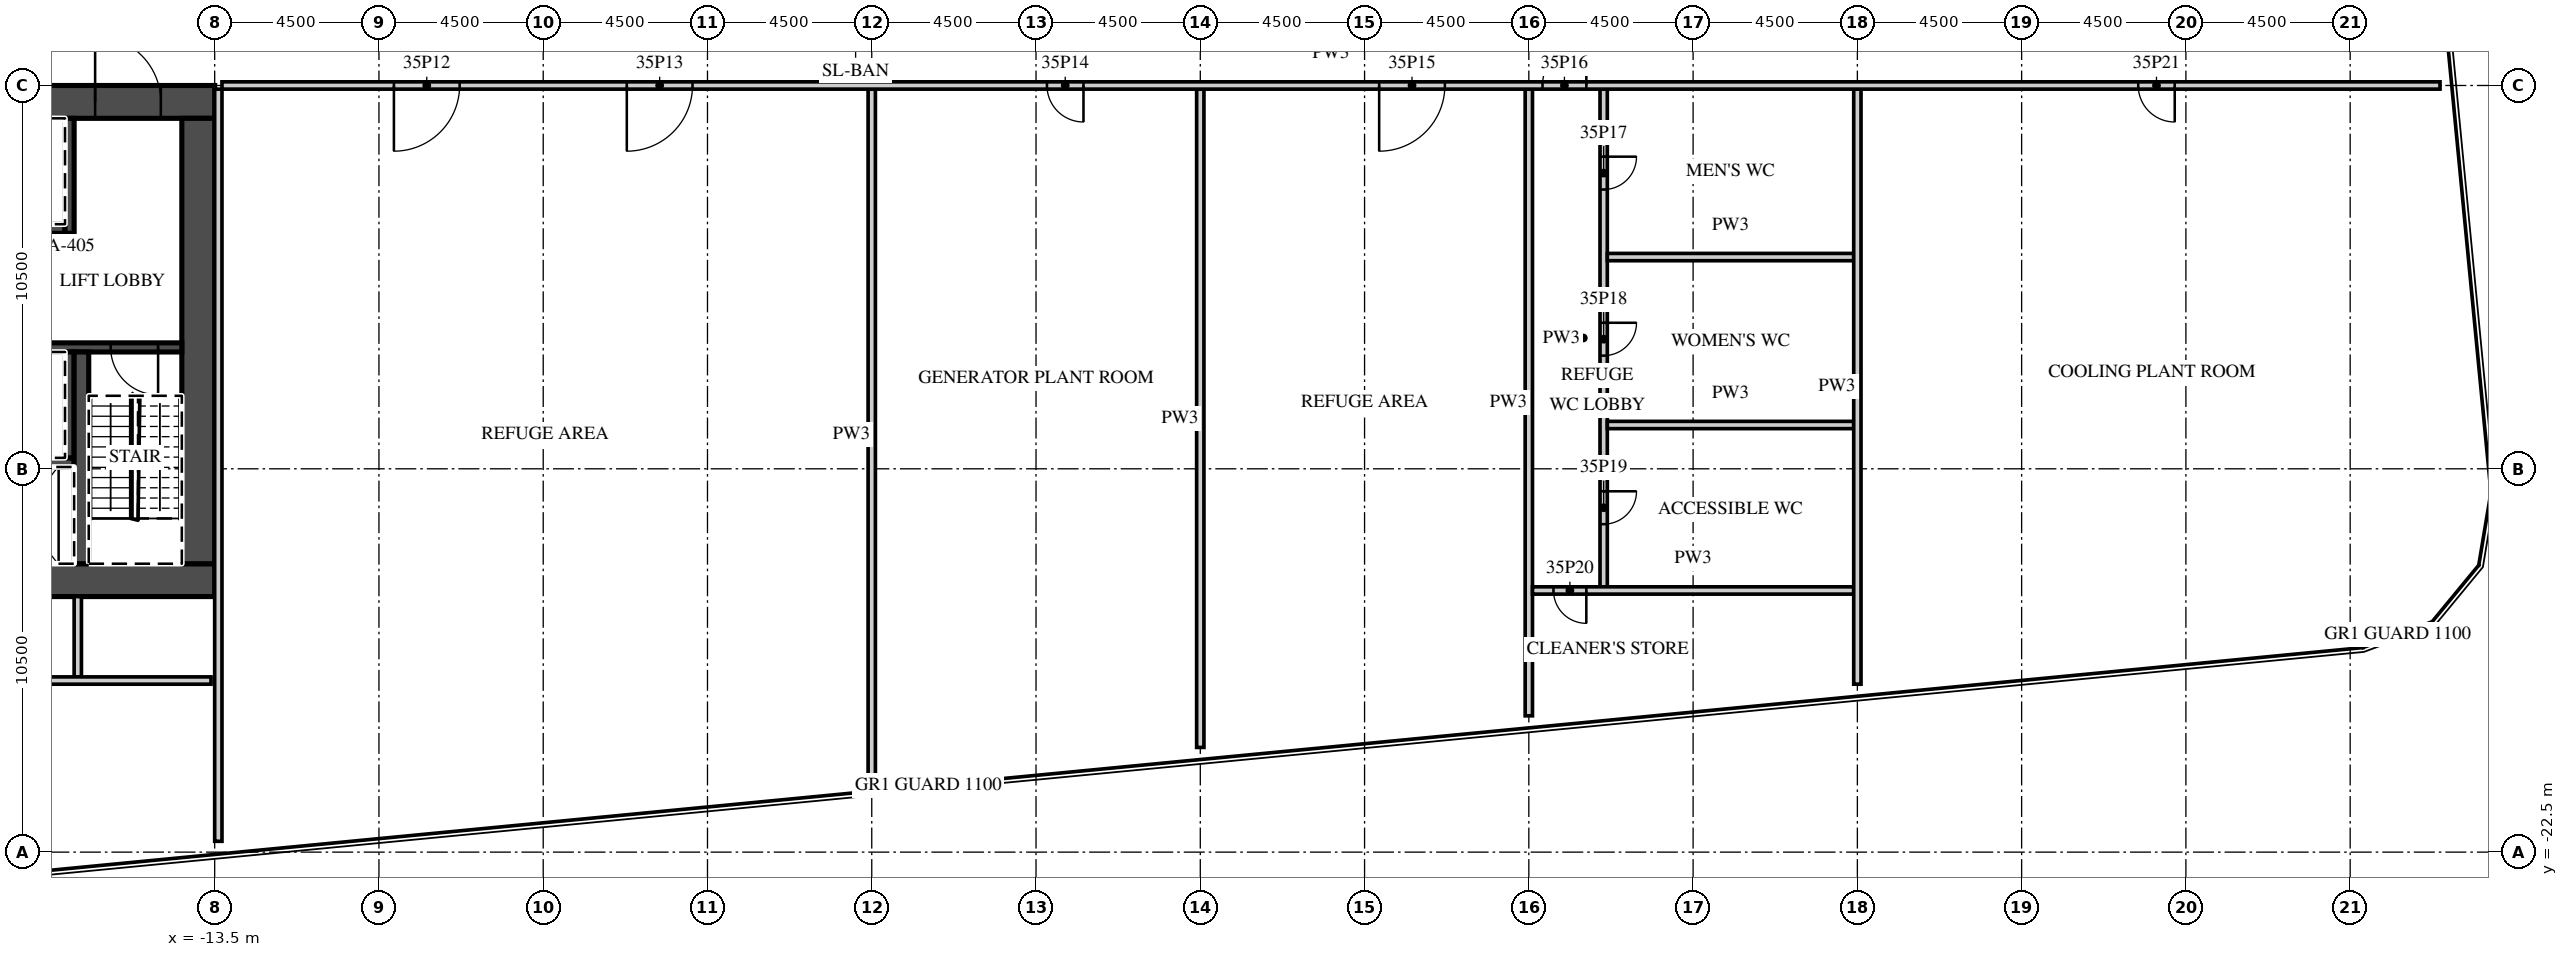
"""IFC4 building model, lengths in metres.
Left out: names, types, materials, properties, quantities, classifications, styles, units other than length and angle.
Written with IfcOpenShell. Run it as: python <this file> out.ifc"""

import sys

from ifc_helpers import new_model, si_unit, direction, frame, frame_2d, origin, place, context, subcontext, project, spatial, rectangle, extrude, element, fill, save


model = new_model("IFC4")
c1 = context("Model", 3, precision=1e-05, world=origin(), true_north=direction((0.0, 1.0)))
c2 = subcontext(c1, "Body", "Model", "MODEL_VIEW")
j1 = project(units=[si_unit("LENGTHUNIT", "METRE"), si_unit("PLANEANGLEUNIT", "RADIAN")], contexts=[c1])
p1 = place(None, origin())
s1 = spatial("IfcSite", under=j1, at=p1, CompositionType="ELEMENT")
p2 = place(p1, origin())
s2 = spatial("IfcBuilding", under=s1, at=p2, CompositionType="ELEMENT")
p3 = place(p2, frame((0.0, 0.0, 150.4)))
s3 = spatial("IfcBuildingStorey", under=s2, at=p3, CompositionType="ELEMENT", Elevation=150.4)
p4 = place(p3, frame((-31.5, -1.95, 0.0), z_axis=(0.0, 0.0, 1.0), x_axis=(1.0, 0.0, 0.0)))
e1 = element("IfcWall", 1, at=p4, inside=s3, PredefinedType="SHEAR", context=c2, shape_type="SweptSolid", body=[
    extrude(rectangle(XDim=18.0, YDim=0.9, at=frame_2d((9.0, 0.0))), origin(), (0.0, 0.0, 1.0), 4.2),
])
p5 = place(p4, frame((14.725, 0.0, 0.0)))
e2 = element("IfcOpeningElement", 2, at=p5, cuts=e1, PredefinedType="OPENING", context=c2, shape_type="SweptSolid", body=[
    extrude(rectangle(XDim=1.8, YDim=2.1, at=frame_2d((0.9, 1.05))), frame((0.0, 0.46, 0.0), z_axis=(0.0, -1.0, 0.0), x_axis=(1.0, 0.0, 0.0)), (0.0, 0.0, 1.0), 0.92),
])
p6 = place(p3, frame((-20.3, -15.05, 0.0), z_axis=(0.0, 0.0, 1.0), x_axis=(1.0, 0.0, 0.0)))
e3 = element("IfcWall", 3, at=p6, inside=s3, PredefinedType="SHEAR", context=c2, shape_type="SweptSolid", body=[
    extrude(rectangle(XDim=6.8, YDim=0.9, at=frame_2d((3.4, 0.0))), origin(), (0.0, 0.0, 1.0), 4.2),
])
p7 = place(p6, frame((0.875, 0.0, 0.0)))
e4 = element("IfcOpeningElement", 4, at=p7, cuts=e3, PredefinedType="OPENING", context=c2, shape_type="SweptSolid", body=[
    extrude(rectangle(XDim=1.2, YDim=2.1, at=frame_2d((0.6, 1.05))), frame((0.0, 0.46, 0.0), z_axis=(0.0, -1.0, 0.0), x_axis=(1.0, 0.0, 0.0)), (0.0, 0.0, 1.0), 0.92),
])
p8 = place(p3, frame((-13.95, -14.6, 0.0), z_axis=(0.0, 0.0, 1.0), x_axis=(0.0, 1.0, 0.0)))
e5 = element("IfcWall", 5, at=p8, inside=s3, PredefinedType="SHEAR", context=c2, shape_type="SweptSolid", body=[
    extrude(rectangle(XDim=12.2, YDim=0.9, at=frame_2d((6.1, 0.0))), origin(), (0.0, 0.0, 1.0), 4.2),
])
p9 = place(p3, frame((-30.6, -5.425, 0.0), z_axis=(0.0, 0.0, 1.0), x_axis=(1.0, 0.0, 0.0)))
e6 = element("IfcWall", 6, at=p9, inside=s3, PredefinedType="SHEAR", context=c2, shape_type="SweptSolid", body=[
    extrude(rectangle(XDim=13.0, YDim=0.25, at=frame_2d((6.5, 0.0))), origin(), (0.0, 0.0, 1.0), 4.2),
])
p10 = place(p3, frame((-17.475, -5.55, 0.0), z_axis=(0.0, 0.0, 1.0), x_axis=(0.0, 1.0, 0.0)))
e7 = element("IfcWall", 7, at=p10, inside=s3, PredefinedType="SHEAR", context=c2, shape_type="SweptSolid", body=[
    extrude(rectangle(XDim=3.15, YDim=0.25, at=frame_2d((1.575, 0.0))), origin(), (0.0, 0.0, 1.0), 4.2),
])
p11 = place(p3, frame((-30.6, -8.675, 0.0), z_axis=(0.0, 0.0, 1.0), x_axis=(1.0, 0.0, 0.0)))
e8 = element("IfcWall", 8, at=p11, inside=s3, PredefinedType="SHEAR", context=c2, shape_type="SweptSolid", body=[
    extrude(rectangle(XDim=16.2, YDim=0.25, at=frame_2d((8.1, 0.0))), origin(), (0.0, 0.0, 1.0), 4.2),
])
p12 = place(p11, frame((0.6, 0.0, 0.0)))
e9 = element("IfcOpeningElement", 9, at=p12, cuts=e8, PredefinedType="OPENING", context=c2, shape_type="SweptSolid", body=[
    extrude(rectangle(XDim=1.2, YDim=2.1, at=frame_2d((0.6, 1.05))), frame((0.0, 0.135, 0.0), z_axis=(0.0, -1.0, 0.0), x_axis=(1.0, 0.0, 0.0)), (0.0, 0.0, 1.0), 0.27),
])
p13 = place(p11, frame((3.25, 0.0, 0.0)))
e10 = element("IfcOpeningElement", 10, at=p13, cuts=e8, PredefinedType="OPENING", context=c2, shape_type="SweptSolid", body=[
    extrude(rectangle(XDim=1.2, YDim=2.1, at=frame_2d((0.6, 1.05))), frame((0.0, 0.135, 0.0), z_axis=(0.0, -1.0, 0.0), x_axis=(1.0, 0.0, 0.0)), (0.0, 0.0, 1.0), 0.27),
])
p14 = place(p11, frame((5.9, 0.0, 0.0)))
e11 = element("IfcOpeningElement", 11, at=p14, cuts=e8, PredefinedType="OPENING", context=c2, shape_type="SweptSolid", body=[
    extrude(rectangle(XDim=1.2, YDim=2.1, at=frame_2d((0.6, 1.05))), frame((0.0, 0.135, 0.0), z_axis=(0.0, -1.0, 0.0), x_axis=(1.0, 0.0, 0.0)), (0.0, 0.0, 1.0), 0.27),
])
p15 = place(p11, frame((14.25, 0.0, 0.0)))
e12 = element("IfcOpeningElement", 12, at=p15, cuts=e8, PredefinedType="OPENING", context=c2, shape_type="SweptSolid", body=[
    extrude(rectangle(XDim=1.3, YDim=2.1, at=frame_2d((0.65, 1.05))), frame((0.0, 0.135, 0.0), z_axis=(0.0, -1.0, 0.0), x_axis=(1.0, 0.0, 0.0)), (0.0, 0.0, 1.0), 0.27),
])
p16 = place(p3, frame((-30.6, -11.825, 0.0), z_axis=(0.0, 0.0, 1.0), x_axis=(1.0, 0.0, 0.0)))
e13 = element("IfcWall", 13, at=p16, inside=s3, PredefinedType="SHEAR", context=c2, shape_type="SweptSolid", body=[
    extrude(rectangle(XDim=13.25, YDim=0.25, at=frame_2d((6.625, 0.0))), origin(), (0.0, 0.0, 1.0), 4.2),
])
p17 = place(p3, frame((-17.475, -11.7, 0.0), z_axis=(0.0, 0.0, 1.0), x_axis=(0.0, 1.0, 0.0)))
e14 = element("IfcWall", 14, at=p17, inside=s3, PredefinedType="SHEAR", context=c2, shape_type="SweptSolid", body=[
    extrude(rectangle(XDim=2.9, YDim=0.25, at=frame_2d((1.45, 0.0))), origin(), (0.0, 0.0, 1.0), 4.2),
])
p18 = place(p3, frame((-17.15, -14.6, 0.0), z_axis=(0.0, 0.0, 1.0), x_axis=(0.0, 1.0, 0.0)))
e15 = element("IfcWall", 15, at=p18, inside=s3, PredefinedType="SHEAR", context=c2, shape_type="SweptSolid", body=[
    extrude(rectangle(XDim=5.8, YDim=0.4, at=frame_2d((2.9, 0.0))), origin(), (0.0, 0.0, 1.0), 4.2),
])
p19 = place(p3, frame((-17.25, -17.7, 0.0), z_axis=(0.0, 0.0, 1.0), x_axis=(0.0, 1.0, 0.0)))
e16 = element("IfcWall", 16, at=p19, inside=s3, PredefinedType="PARTITIONING", context=c2, shape_type="SweptSolid", body=[
    extrude(rectangle(XDim=2.2, YDim=0.2, at=frame_2d((1.1, 0.0))), origin(), (0.0, 0.0, 1.0), 4.2),
])
p20 = place(p3, frame((-37.477, -17.8, 0.0), z_axis=(0.0, 0.0, 1.0), x_axis=(1.0, 0.0, 0.0)))
e17 = element("IfcWall", 17, at=p20, inside=s3, PredefinedType="PARTITIONING", context=c2, shape_type="SweptSolid", body=[
    extrude(rectangle(XDim=23.877, YDim=0.2, at=frame_2d((11.938, 0.0))), origin(), (0.0, 0.0, 1.0), 4.2),
])
p21 = place(p20, frame((6.365, 0.0, 0.0)))
e18 = element("IfcOpeningElement", 18, at=p21, cuts=e17, PredefinedType="OPENING", context=c2, shape_type="SweptSolid", body=[
    extrude(rectangle(XDim=0.9, YDim=2.1, at=frame_2d((0.45, 1.05))), frame((0.0, 0.11, 0.0), z_axis=(0.0, -1.0, 0.0), x_axis=(1.0, 0.0, 0.0)), (0.0, 0.0, 1.0), 0.22),
])
p22 = place(p20, frame((14.665, 0.0, 0.0)))
e19 = element("IfcOpeningElement", 19, at=p22, cuts=e17, PredefinedType="OPENING", context=c2, shape_type="SweptSolid", body=[
    extrude(rectangle(XDim=0.9, YDim=2.1, at=frame_2d((0.45, 1.05))), frame((0.0, 0.11, 0.0), z_axis=(0.0, -1.0, 0.0), x_axis=(1.0, 0.0, 0.0)), (0.0, 0.0, 1.0), 0.22),
])
p23 = place(p3, frame((4.5, -20.499, 0.0), z_axis=(0.0, 0.0, 1.0), x_axis=(0.0, 1.0, 0.0)))
e20 = element("IfcWall", 20, at=p23, inside=s3, PredefinedType="PARTITIONING", context=c2, shape_type="SweptSolid", body=[
    extrude(rectangle(XDim=18.899, YDim=0.2, at=frame_2d((9.45, 0.0))), origin(), (0.0, 0.0, 1.0), 4.2),
])
p24 = place(p3, frame((13.5, -19.633, 0.0), z_axis=(0.0, 0.0, 1.0), x_axis=(0.0, 1.0, 0.0)))
e21 = element("IfcWall", 21, at=p24, inside=s3, PredefinedType="PARTITIONING", context=c2, shape_type="SweptSolid", body=[
    extrude(rectangle(XDim=18.032, YDim=0.2, at=frame_2d((9.016, 0.0))), origin(), (0.0, 0.0, 1.0), 4.2),
])
p25 = place(p3, frame((22.5, -18.766, 0.0), z_axis=(0.0, 0.0, 1.0), x_axis=(0.0, 1.0, 0.0)))
e22 = element("IfcWall", 22, at=p25, inside=s3, PredefinedType="PARTITIONING", context=c2, shape_type="SweptSolid", body=[
    extrude(rectangle(XDim=17.166, YDim=0.2, at=frame_2d((8.583, 0.0))), origin(), (0.0, 0.0, 1.0), 4.2),
])
p26 = place(p3, frame((24.55, -15.233, 0.0), z_axis=(0.0, 0.0, 1.0), x_axis=(0.0, 1.0, 0.0)))
e23 = element("IfcWall", 23, at=p26, inside=s3, PredefinedType="PARTITIONING", context=c2, shape_type="SweptSolid", body=[
    extrude(rectangle(XDim=13.633, YDim=0.2, at=frame_2d((6.816, 0.0))), origin(), (0.0, 0.0, 1.0), 4.2),
])
p27 = place(p26, frame((10.883, 0.0, 0.0)))
e24 = element("IfcOpeningElement", 24, at=p27, cuts=e23, PredefinedType="OPENING", context=c2, shape_type="SweptSolid", body=[
    extrude(rectangle(XDim=0.9, YDim=2.1, at=frame_2d((0.45, 1.05))), frame((0.0, 0.11, 0.0), z_axis=(0.0, -1.0, 0.0), x_axis=(1.0, 0.0, 0.0)), (0.0, 0.0, 1.0), 0.22),
])
p28 = place(p26, frame((6.333, 0.0, 0.0)))
e25 = element("IfcOpeningElement", 25, at=p28, cuts=e23, PredefinedType="OPENING", context=c2, shape_type="SweptSolid", body=[
    extrude(rectangle(XDim=0.9, YDim=2.1, at=frame_2d((0.45, 1.05))), frame((0.0, 0.11, 0.0), z_axis=(0.0, -1.0, 0.0), x_axis=(1.0, 0.0, 0.0)), (0.0, 0.0, 1.0), 0.22),
])
p29 = place(p26, frame((1.717, 0.0, 0.0)))
e26 = element("IfcOpeningElement", 26, at=p29, cuts=e23, PredefinedType="OPENING", context=c2, shape_type="SweptSolid", body=[
    extrude(rectangle(XDim=0.9, YDim=2.1, at=frame_2d((0.45, 1.05))), frame((0.0, 0.11, 0.0), z_axis=(0.0, -1.0, 0.0), x_axis=(1.0, 0.0, 0.0)), (0.0, 0.0, 1.0), 0.22),
])
for number, where, z_axis, x_axis in (
    (27, (24.65, -6.2, 0.0), (0.0, 0.0, 1.0), (1.0, 0.0, 0.0)),
    (28, (24.65, -10.8, 0.0), (0.0, 0.0, 1.0), (1.0, 0.0, 0.0)),
):
    element("IfcWall", number, at=place(p3, frame(where, z_axis=z_axis, x_axis=x_axis)), inside=s3, PredefinedType="PARTITIONING", context=c2, shape_type="SweptSolid", body=[
        extrude(rectangle(XDim=6.75, YDim=0.2, at=frame_2d((3.375, 0.0))), origin(), (0.0, 0.0, 1.0), 4.2),
    ])
p30 = place(p3, frame((22.6, -15.333, 0.0), z_axis=(0.0, 0.0, 1.0), x_axis=(1.0, 0.0, 0.0)))
e29 = element("IfcWall", 29, at=p30, inside=s3, PredefinedType="PARTITIONING", context=c2, shape_type="SweptSolid", body=[
    extrude(rectangle(XDim=8.8, YDim=0.2, at=frame_2d((4.4, 0.0))), origin(), (0.0, 0.0, 1.0), 4.2),
])
p31 = place(p30, frame((0.575, 0.0, 0.0)))
e30 = element("IfcOpeningElement", 30, at=p31, cuts=e29, PredefinedType="OPENING", context=c2, shape_type="SweptSolid", body=[
    extrude(rectangle(XDim=0.9, YDim=2.1, at=frame_2d((0.45, 1.05))), frame((0.0, 0.11, 0.0), z_axis=(0.0, -1.0, 0.0), x_axis=(1.0, 0.0, 0.0)), (0.0, 0.0, 1.0), 0.22),
])
p32 = place(p3, frame((31.5, -17.899, 0.0), z_axis=(0.0, 0.0, 1.0), x_axis=(0.0, 1.0, 0.0)))
e31 = element("IfcWall", 31, at=p32, inside=s3, PredefinedType="PARTITIONING", context=c2, shape_type="SweptSolid", body=[
    extrude(rectangle(XDim=16.299, YDim=0.2, at=frame_2d((8.15, 0.0))), origin(), (0.0, 0.0, 1.0), 4.2),
])
p33 = place(p3, frame((-13.3, -1.5, 0.0), z_axis=(0.0, 0.0, 1.0), x_axis=(1.0, 0.0, 0.0)))
e32 = element("IfcWall", 32, at=p33, inside=s3, PredefinedType="PARTITIONING", context=c2, shape_type="SweptSolid", body=[
    extrude(rectangle(XDim=60.761, YDim=0.2, at=frame_2d((30.38, 0.0))), origin(), (0.0, 0.0, 1.0), 4.2),
])
p34 = place(p33, frame((4.71, 0.0, 0.0)))
e33 = element("IfcOpeningElement", 33, at=p34, cuts=e32, PredefinedType="OPENING", context=c2, shape_type="SweptSolid", body=[
    extrude(rectangle(XDim=1.8, YDim=2.1, at=frame_2d((0.9, 1.05))), frame((0.0, 0.11, 0.0), z_axis=(0.0, -1.0, 0.0), x_axis=(1.0, 0.0, 0.0)), (0.0, 0.0, 1.0), 0.22),
])
p35 = place(p33, frame((11.09, 0.0, 0.0)))
e34 = element("IfcOpeningElement", 34, at=p35, cuts=e32, PredefinedType="OPENING", context=c2, shape_type="SweptSolid", body=[
    extrude(rectangle(XDim=1.8, YDim=2.1, at=frame_2d((0.9, 1.05))), frame((0.0, 0.11, 0.0), z_axis=(0.0, -1.0, 0.0), x_axis=(1.0, 0.0, 0.0)), (0.0, 0.0, 1.0), 0.22),
])
p36 = place(p33, frame((22.6, 0.0, 0.0)))
e35 = element("IfcOpeningElement", 35, at=p36, cuts=e32, PredefinedType="OPENING", context=c2, shape_type="SweptSolid", body=[
    extrude(rectangle(XDim=1.0, YDim=2.1, at=frame_2d((0.5, 1.05))), frame((0.0, 0.11, 0.0), z_axis=(0.0, -1.0, 0.0), x_axis=(1.0, 0.0, 0.0)), (0.0, 0.0, 1.0), 0.22),
])
p37 = place(p33, frame((31.7, 0.0, 0.0)))
e36 = element("IfcOpeningElement", 36, at=p37, cuts=e32, PredefinedType="OPENING", context=c2, shape_type="SweptSolid", body=[
    extrude(rectangle(XDim=1.8, YDim=2.1, at=frame_2d((0.9, 1.05))), frame((0.0, 0.11, 0.0), z_axis=(0.0, -1.0, 0.0), x_axis=(1.0, 0.0, 0.0)), (0.0, 0.0, 1.0), 0.22),
])
p38 = place(p33, frame((36.175, 0.0, 0.0)))
e37 = element("IfcOpeningElement", 37, at=p38, cuts=e32, PredefinedType="OPENING", context=c2, shape_type="SweptSolid", body=[
    extrude(rectangle(XDim=1.2, YDim=2.1, at=frame_2d((0.6, 1.05))), frame((0.0, 0.11, 0.0), z_axis=(0.0, -1.0, 0.0), x_axis=(1.0, 0.0, 0.0)), (0.0, 0.0, 1.0), 0.22),
])
p39 = place(p33, frame((52.494, 0.0, 0.0)))
e38 = element("IfcOpeningElement", 38, at=p39, cuts=e32, PredefinedType="OPENING", context=c2, shape_type="SweptSolid", body=[
    extrude(rectangle(XDim=1.0, YDim=2.1, at=frame_2d((0.5, 1.05))), frame((0.0, 0.11, 0.0), z_axis=(0.0, -1.0, 0.0), x_axis=(1.0, 0.0, 0.0)), (0.0, 0.0, 1.0), 0.22),
])
p40 = place(p3, frame((-13.4, -22.204, 0.0), z_axis=(0.0, 0.0, 1.0), x_axis=(0.0, 1.0, 0.0)))
e39 = element("IfcWall", 39, at=p40, inside=s3, PredefinedType="PARTITIONING", context=c2, shape_type="SweptSolid", body=[
    extrude(rectangle(XDim=20.604, YDim=0.2, at=frame_2d((10.302, 0.0))), origin(), (0.0, 0.0, 1.0), 4.2),
])
p41 = place(p5, origin())
e40 = element("IfcDoor", 40, at=p41, inside=s3, OperationType="DOUBLE_DOOR_DOUBLE_SWING", PredefinedType="DOOR", context=c2, shape_type="SweptSolid", body=[
    extrude(rectangle(XDim=1.8, YDim=2.1, at=frame_2d((0.9, 1.05))), frame((0.0, 0.025, 0.0), z_axis=(0.0, -1.0, 0.0), x_axis=(1.0, 0.0, 0.0)), (0.0, 0.0, 1.0), 0.05),
])
fill(e2, e40)
p42 = place(p15, origin())
e41 = element("IfcDoor", 41, at=p42, inside=s3, OperationType="SINGLE_SWING_RIGHT", PredefinedType="DOOR", context=c2, shape_type="SweptSolid", body=[
    extrude(rectangle(XDim=1.3, YDim=2.1, at=frame_2d((0.65, 1.05))), frame((0.0, 0.025, 0.0), z_axis=(0.0, -1.0, 0.0), x_axis=(1.0, 0.0, 0.0)), (0.0, 0.0, 1.0), 0.05),
])
fill(e12, e41)
p43 = place(p34, origin())
e42 = element("IfcDoor", 42, at=p43, inside=s3, OperationType="DOUBLE_DOOR_DOUBLE_SWING", PredefinedType="DOOR", context=c2, shape_type="SweptSolid", body=[
    extrude(rectangle(XDim=1.8, YDim=2.1, at=frame_2d((0.9, 1.05))), frame((0.0, 0.025, 0.0), z_axis=(0.0, -1.0, 0.0), x_axis=(1.0, 0.0, 0.0)), (0.0, 0.0, 1.0), 0.05),
])
fill(e33, e42)
p44 = place(p35, origin())
e43 = element("IfcDoor", 43, at=p44, inside=s3, OperationType="DOUBLE_DOOR_DOUBLE_SWING", PredefinedType="DOOR", context=c2, shape_type="SweptSolid", body=[
    extrude(rectangle(XDim=1.8, YDim=2.1, at=frame_2d((0.9, 1.05))), frame((0.0, 0.025, 0.0), z_axis=(0.0, -1.0, 0.0), x_axis=(1.0, 0.0, 0.0)), (0.0, 0.0, 1.0), 0.05),
])
fill(e34, e43)
p45 = place(p36, origin())
e44 = element("IfcDoor", 44, at=p45, inside=s3, OperationType="SINGLE_SWING_RIGHT", PredefinedType="DOOR", context=c2, shape_type="SweptSolid", body=[
    extrude(rectangle(XDim=1.0, YDim=2.1, at=frame_2d((0.5, 1.05))), frame((0.0, 0.025, 0.0), z_axis=(0.0, -1.0, 0.0), x_axis=(1.0, 0.0, 0.0)), (0.0, 0.0, 1.0), 0.05),
])
fill(e35, e44)
p46 = place(p37, origin())
e45 = element("IfcDoor", 45, at=p46, inside=s3, OperationType="DOUBLE_DOOR_DOUBLE_SWING", PredefinedType="DOOR", context=c2, shape_type="SweptSolid", body=[
    extrude(rectangle(XDim=1.8, YDim=2.1, at=frame_2d((0.9, 1.05))), frame((0.0, 0.025, 0.0), z_axis=(0.0, -1.0, 0.0), x_axis=(1.0, 0.0, 0.0)), (0.0, 0.0, 1.0), 0.05),
])
fill(e36, e45)
p47 = place(p38, origin())
e46 = element("IfcDoor", 46, at=p47, inside=s3, OperationType="SINGLE_SWING_RIGHT", PredefinedType="DOOR", context=c2, shape_type="SweptSolid", body=[
    extrude(rectangle(XDim=1.2, YDim=2.1, at=frame_2d((0.6, 1.05))), frame((0.0, 0.025, 0.0), z_axis=(0.0, -1.0, 0.0), x_axis=(1.0, 0.0, 0.0)), (0.0, 0.0, 1.0), 0.05),
])
fill(e37, e46)
p48 = place(p27, origin())
e47 = element("IfcDoor", 47, at=p48, inside=s3, OperationType="SINGLE_SWING_RIGHT", PredefinedType="DOOR", context=c2, shape_type="SweptSolid", body=[
    extrude(rectangle(XDim=0.9, YDim=2.1, at=frame_2d((0.45, 1.05))), frame((0.0, 0.025, 0.0), z_axis=(0.0, -1.0, 0.0), x_axis=(1.0, 0.0, 0.0)), (0.0, 0.0, 1.0), 0.05),
])
fill(e24, e47)
p49 = place(p28, origin())
e48 = element("IfcDoor", 48, at=p49, inside=s3, OperationType="SINGLE_SWING_RIGHT", PredefinedType="DOOR", context=c2, shape_type="SweptSolid", body=[
    extrude(rectangle(XDim=0.9, YDim=2.1, at=frame_2d((0.45, 1.05))), frame((0.0, 0.025, 0.0), z_axis=(0.0, -1.0, 0.0), x_axis=(1.0, 0.0, 0.0)), (0.0, 0.0, 1.0), 0.05),
])
fill(e25, e48)
p50 = place(p29, origin())
e49 = element("IfcDoor", 49, at=p50, inside=s3, OperationType="SINGLE_SWING_RIGHT", PredefinedType="DOOR", context=c2, shape_type="SweptSolid", body=[
    extrude(rectangle(XDim=0.9, YDim=2.1, at=frame_2d((0.45, 1.05))), frame((0.0, 0.025, 0.0), z_axis=(0.0, -1.0, 0.0), x_axis=(1.0, 0.0, 0.0)), (0.0, 0.0, 1.0), 0.05),
])
fill(e26, e49)
p51 = place(p31, origin())
e50 = element("IfcDoor", 50, at=p51, inside=s3, OperationType="SINGLE_SWING_RIGHT", PredefinedType="DOOR", context=c2, shape_type="SweptSolid", body=[
    extrude(rectangle(XDim=0.9, YDim=2.1, at=frame_2d((0.45, 1.05))), frame((0.0, 0.025, 0.0), z_axis=(0.0, -1.0, 0.0), x_axis=(1.0, 0.0, 0.0)), (0.0, 0.0, 1.0), 0.05),
])
fill(e30, e50)
p52 = place(p39, origin())
e51 = element("IfcDoor", 51, at=p52, inside=s3, OperationType="SINGLE_SWING_RIGHT", PredefinedType="DOOR", context=c2, shape_type="SweptSolid", body=[
    extrude(rectangle(XDim=1.0, YDim=2.1, at=frame_2d((0.5, 1.05))), frame((0.0, 0.025, 0.0), z_axis=(0.0, -1.0, 0.0), x_axis=(1.0, 0.0, 0.0)), (0.0, 0.0, 1.0), 0.05),
])
fill(e38, e51)
save(model, sys.argv[1])
